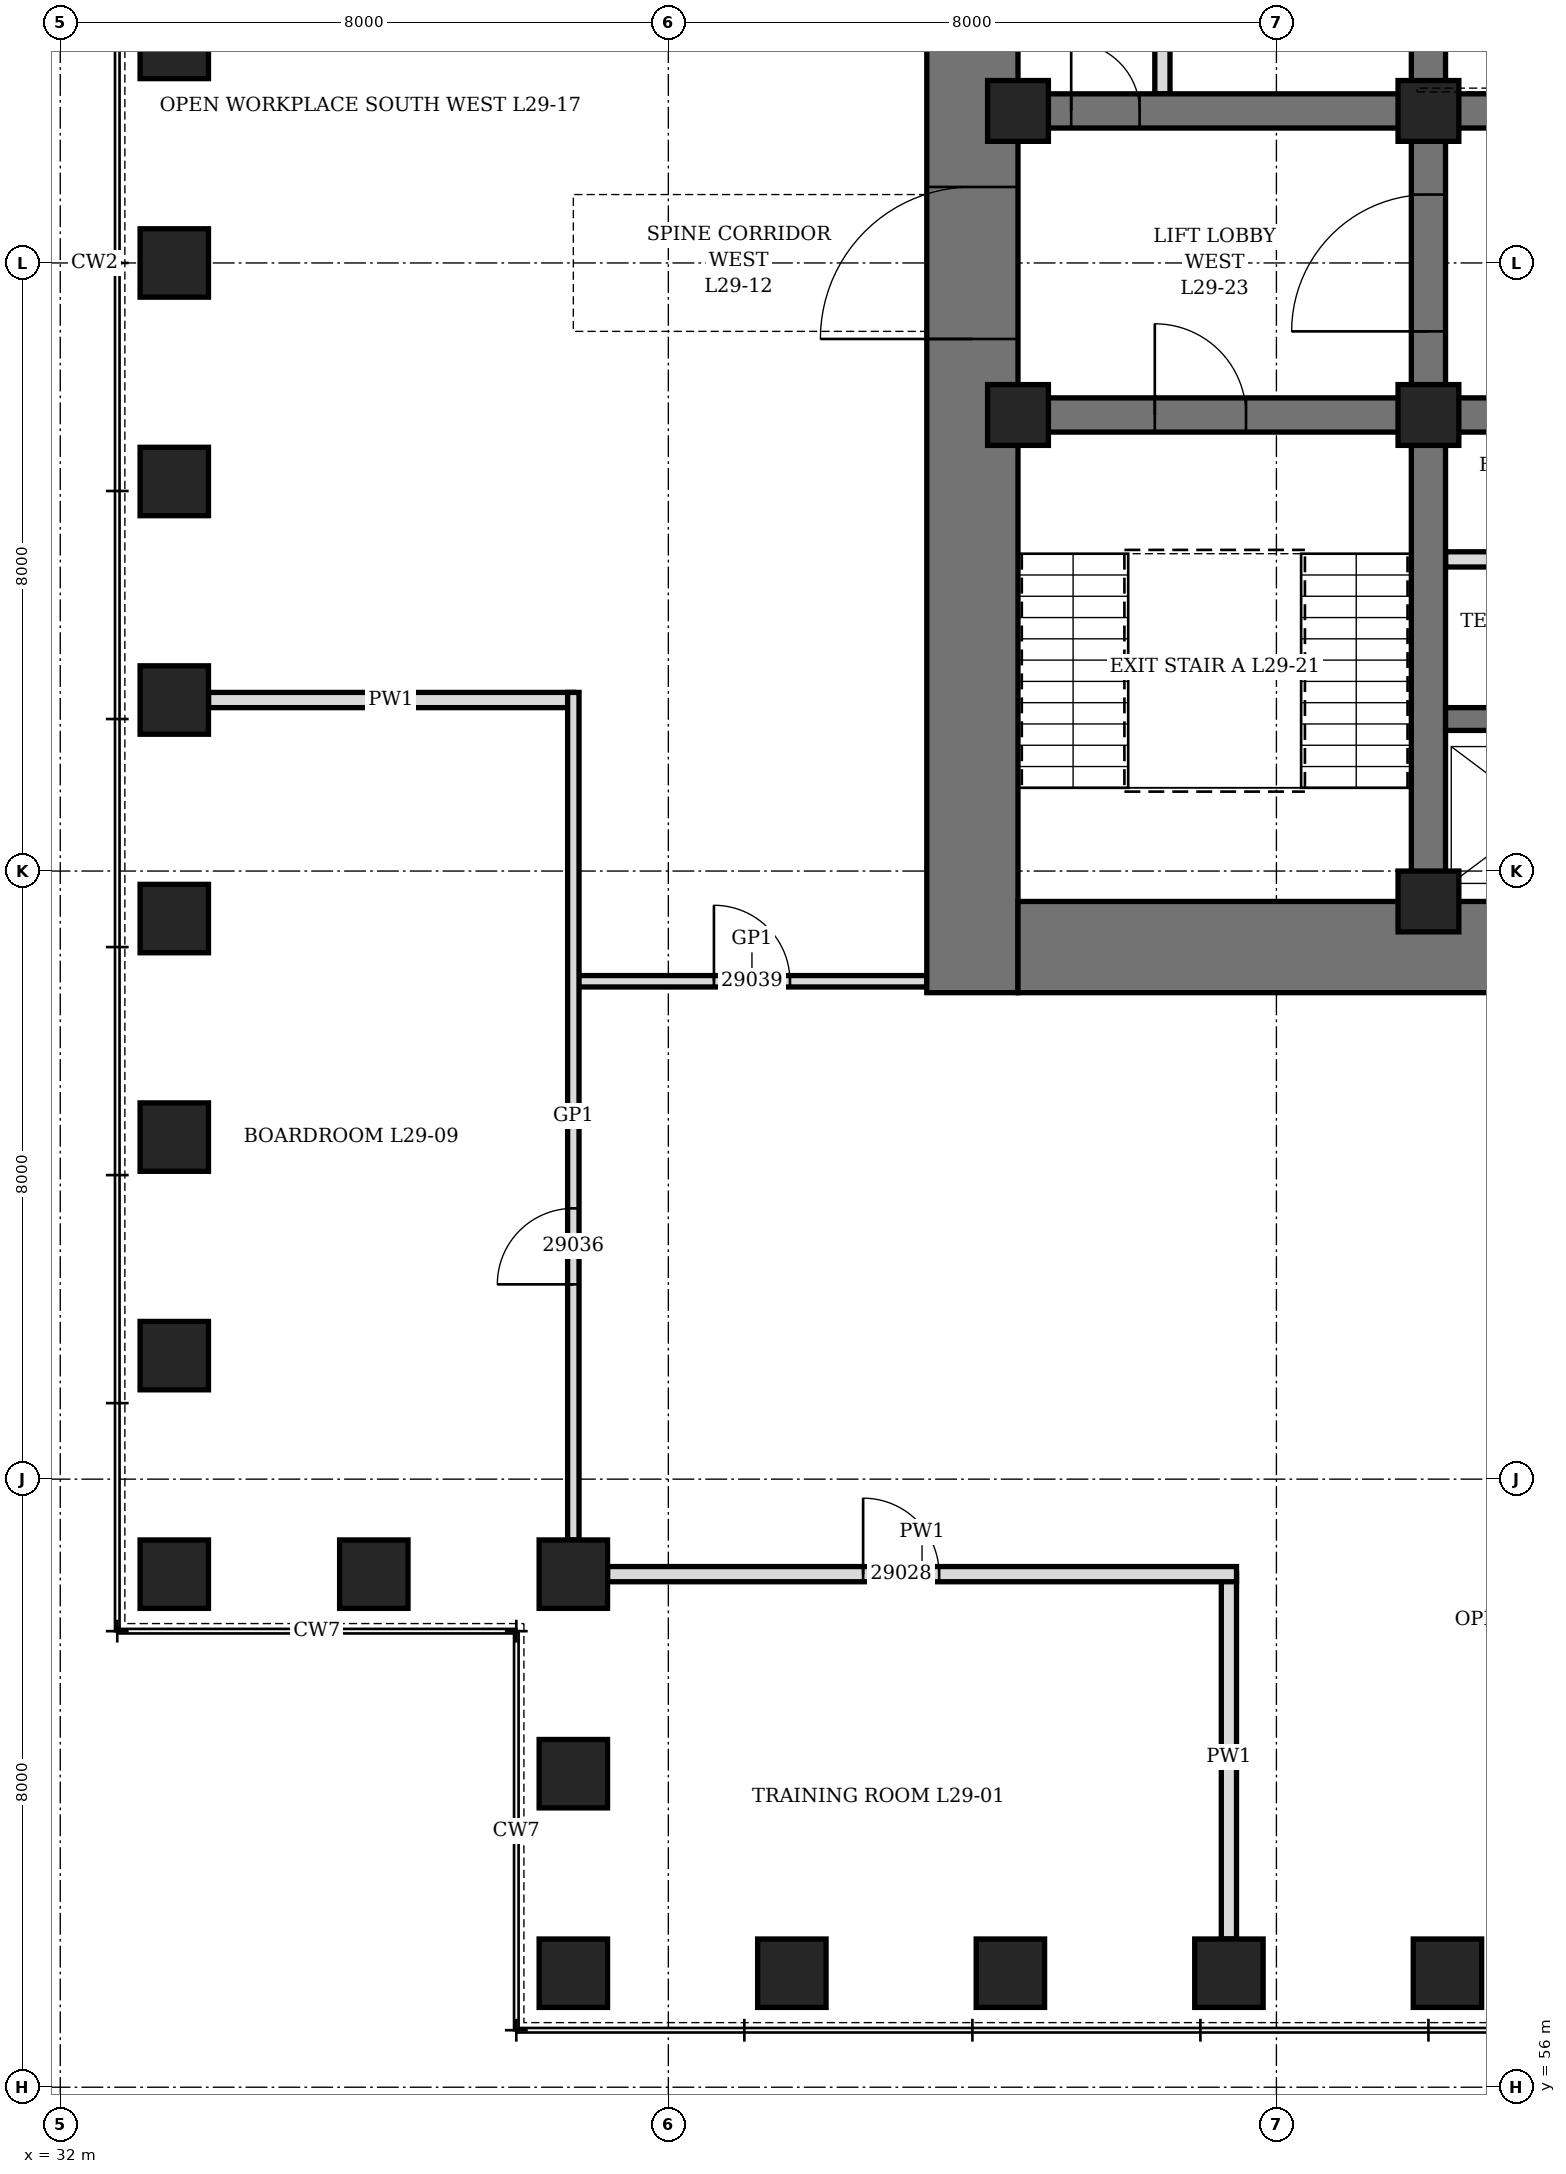
"""IFC4 building model, lengths in metres.
Left out: names, types, materials, properties, quantities, classifications, styles, units other than length and angle.
Written with IfcOpenShell. Run it as: python <this file> out.ifc"""

import sys

from ifc_helpers import new_model, si_unit, direction, frame, frame_2d, origin, origin_2d, place, context, subcontext, project, spatial, rectangle, hollow_rectangle, extrude, element, fill, save


model = new_model("IFC4")
c1 = context("Model", 3, precision=1e-05, world=origin(), true_north=direction((0.0, 1.0)))
c2 = subcontext(c1, "Body", "Model", "MODEL_VIEW")
j1 = project(units=[si_unit("LENGTHUNIT", "METRE"), si_unit("PLANEANGLEUNIT", "RADIAN")], contexts=[c1])
p1 = place(None, origin())
s1 = spatial("IfcSite", under=j1, at=p1, CompositionType="ELEMENT")
p2 = place(p1, origin())
s2 = spatial("IfcBuilding", under=s1, at=p2, CompositionType="ELEMENT")
p3 = place(p2, frame((0.0, 0.0, 133.3)))
s3 = spatial("IfcBuildingStorey", under=s2, at=p3, CompositionType="ELEMENT", Elevation=133.3)
for number, where, z_axis, x_axis in (
    (1, (38.75, 57.5, 0.0), (0.0, 0.0, 1.0), (1.0, 0.0, 0.0)),
    (2, (41.625, 57.5, 0.0), (0.0, 0.0, 1.0), (1.0, 0.0, 0.0)),
    (3, (44.5, 57.5, 0.0), (0.0, 0.0, 1.0), (1.0, 0.0, 0.0)),
    (4, (47.375, 57.5, 0.0), (0.0, 0.0, 1.0), (1.0, 0.0, 0.0)),
    (5, (50.25, 57.5, 0.0), (0.0, 0.0, 1.0), (1.0, 0.0, 0.0)),
    (6, (33.5, 82.875, 0.0), (0.0, 0.0, 1.0), (0.0, 1.0, 0.0)),
    (7, (33.5, 80.0, 0.0), (0.0, 0.0, 1.0), (0.0, 1.0, 0.0)),
    (8, (33.5, 77.125, 0.0), (0.0, 0.0, 1.0), (0.0, 1.0, 0.0)),
    (9, (33.5, 74.25, 0.0), (0.0, 0.0, 1.0), (0.0, 1.0, 0.0)),
    (10, (33.5, 71.375, 0.0), (0.0, 0.0, 1.0), (0.0, 1.0, 0.0)),
    (11, (33.5, 68.5, 0.0), (0.0, 0.0, 1.0), (0.0, 1.0, 0.0)),
    (12, (33.5, 65.625, 0.0), (0.0, 0.0, 1.0), (0.0, 1.0, 0.0)),
    (13, (33.5, 62.75, 0.0), (0.0, 0.0, 1.0), (1.0, 0.0, 0.0)),
    (14, (36.125, 62.75, 0.0), (0.0, 0.0, 1.0), (1.0, 0.0, 0.0)),
    (15, (38.75, 62.75, 0.0), (0.0, 0.0, 1.0), (0.0, 1.0, 0.0)),
    (16, (38.75, 60.125, 0.0), (0.0, 0.0, 1.0), (0.0, 1.0, 0.0)),
):
    element("IfcColumn", number, at=place(p3, frame(where, z_axis=z_axis, x_axis=x_axis)), inside=s3, PredefinedType="COLUMN", context=c2, shape_type="SweptSolid", body=[
        extrude(hollow_rectangle(XDim=0.9, YDim=0.9, WallThickness=0.15, at=origin_2d()), origin(), (0.0, 0.0, 1.0), 4.2),
    ])
p4 = place(p3, frame((44.0, 70.4, 0.0), z_axis=(0.0, 0.0, 1.0), x_axis=(0.0, 1.0, 0.0)))
e17 = element("IfcWall", 17, at=p4, inside=s3, PredefinedType="SHEAR", context=c2, shape_type="SweptSolid", body=[
    extrude(rectangle(XDim=19.2, YDim=1.2, at=frame_2d((9.6, 0.0))), origin(), (0.0, 0.0, 1.0), 4.2),
])
p5 = place(p4, frame((8.6, 0.0, 0.0)))
e18 = element("IfcOpeningElement", 18, at=p5, cuts=e17, PredefinedType="OPENING", context=c2, shape_type="SweptSolid", body=[
    extrude(rectangle(XDim=2.0, YDim=2.4, at=frame_2d((1.0, 1.2))), frame((0.0, 0.61, 0.0), z_axis=(0.0, -1.0, 0.0), x_axis=(1.0, 0.0, 0.0)), (0.0, 0.0, 1.0), 1.22),
])
p6 = place(p3, frame((44.6, 71.0, 0.0), z_axis=(0.0, 0.0, 1.0), x_axis=(1.0, 0.0, 0.0)))
e19 = element("IfcWall", 19, at=p6, inside=s3, PredefinedType="SHEAR", context=c2, shape_type="SweptSolid", body=[
    extrude(rectangle(XDim=22.8, YDim=1.2, at=frame_2d((11.4, 0.0))), origin(), (0.0, 0.0, 1.0), 4.2),
])
p7 = place(p3, frame((50.0, 71.6, 0.0), z_axis=(0.0, 0.0, 1.0), x_axis=(0.0, 1.0, 0.0)))
e20 = element("IfcWall", 20, at=p7, inside=s3, PredefinedType="SHEAR", context=c2, shape_type="SweptSolid", body=[
    extrude(rectangle(XDim=16.8, YDim=0.45, at=frame_2d((8.4, 0.0))), origin(), (0.0, 0.0, 1.0), 4.2),
])
p8 = place(p7, frame((7.5, 0.0, 0.0)))
e21 = element("IfcOpeningElement", 21, at=p8, cuts=e20, PredefinedType="OPENING", context=c2, shape_type="SweptSolid", body=[
    extrude(rectangle(XDim=1.8, YDim=2.4, at=frame_2d((0.9, 1.2))), frame((0.0, 0.235, 0.0), z_axis=(0.0, -1.0, 0.0), x_axis=(1.0, 0.0, 0.0)), (0.0, 0.0, 1.0), 0.47),
])
p9 = place(p3, frame((44.6, 78.0, 0.0), z_axis=(0.0, 0.0, 1.0), x_axis=(1.0, 0.0, 0.0)))
e22 = element("IfcWall", 22, at=p9, inside=s3, PredefinedType="SHEAR", context=c2, shape_type="SweptSolid", body=[
    extrude(rectangle(XDim=5.175, YDim=0.45, at=frame_2d((2.587, 0.0))), origin(), (0.0, 0.0, 1.0), 4.2),
])
p10 = place(p9, frame((1.8, 0.0, 0.0)))
e23 = element("IfcOpeningElement", 23, at=p10, cuts=e22, PredefinedType="OPENING", context=c2, shape_type="SweptSolid", body=[
    extrude(rectangle(XDim=1.2, YDim=2.1, at=frame_2d((0.6, 1.05))), frame((0.0, 0.235, 0.0), z_axis=(0.0, -1.0, 0.0), x_axis=(1.0, 0.0, 0.0)), (0.0, 0.0, 1.0), 0.47),
])
p11 = place(p3, frame((44.6, 82.0, 0.0), z_axis=(0.0, 0.0, 1.0), x_axis=(1.0, 0.0, 0.0)))
e24 = element("IfcWall", 24, at=p11, inside=s3, PredefinedType="SHEAR", context=c2, shape_type="SweptSolid", body=[
    extrude(rectangle(XDim=5.175, YDim=0.45, at=frame_2d((2.587, 0.0))), origin(), (0.0, 0.0, 1.0), 4.2),
])
p12 = place(p11, frame((0.7, 0.0, 0.0)))
e25 = element("IfcOpeningElement", 25, at=p12, cuts=e24, PredefinedType="OPENING", context=c2, shape_type="SweptSolid", body=[
    extrude(rectangle(XDim=0.9, YDim=2.1, at=frame_2d((0.45, 1.05))), frame((0.0, 0.235, 0.0), z_axis=(0.0, -1.0, 0.0), x_axis=(1.0, 0.0, 0.0)), (0.0, 0.0, 1.0), 0.47),
])
p13 = place(p3, frame((50.225, 78.0, 0.0), z_axis=(0.0, 0.0, 1.0), x_axis=(1.0, 0.0, 0.0)))
e26 = element("IfcWall", 26, at=p13, inside=s3, PredefinedType="SHEAR", context=c2, shape_type="SweptSolid", body=[
    extrude(rectangle(XDim=11.55, YDim=0.45, at=frame_2d((5.775, 0.0))), origin(), (0.0, 0.0, 1.0), 4.2),
])
p14 = place(p13, frame((0.825, 0.0, 0.0)))
e27 = element("IfcOpeningElement", 27, at=p14, cuts=e26, PredefinedType="OPENING", context=c2, shape_type="SweptSolid", body=[
    extrude(rectangle(XDim=0.9, YDim=2.1, at=frame_2d((0.45, 1.05))), frame((0.0, 0.235, 0.0), z_axis=(0.0, -1.0, 0.0), x_axis=(1.0, 0.0, 0.0)), (0.0, 0.0, 1.0), 0.47),
])
p15 = place(p13, frame((3.825, 0.0, 0.0)))
e28 = element("IfcOpeningElement", 28, at=p15, cuts=e26, PredefinedType="OPENING", context=c2, shape_type="SweptSolid", body=[
    extrude(rectangle(XDim=0.9, YDim=2.1, at=frame_2d((0.45, 1.05))), frame((0.0, 0.235, 0.0), z_axis=(0.0, -1.0, 0.0), x_axis=(1.0, 0.0, 0.0)), (0.0, 0.0, 1.0), 0.47),
])
p16 = place(p13, frame((6.825, 0.0, 0.0)))
e29 = element("IfcOpeningElement", 29, at=p16, cuts=e26, PredefinedType="OPENING", context=c2, shape_type="SweptSolid", body=[
    extrude(rectangle(XDim=0.9, YDim=2.1, at=frame_2d((0.45, 1.05))), frame((0.0, 0.235, 0.0), z_axis=(0.0, -1.0, 0.0), x_axis=(1.0, 0.0, 0.0)), (0.0, 0.0, 1.0), 0.47),
])
p17 = place(p13, frame((9.825, 0.0, 0.0)))
e30 = element("IfcOpeningElement", 30, at=p17, cuts=e26, PredefinedType="OPENING", context=c2, shape_type="SweptSolid", body=[
    extrude(rectangle(XDim=0.9, YDim=2.1, at=frame_2d((0.45, 1.05))), frame((0.0, 0.235, 0.0), z_axis=(0.0, -1.0, 0.0), x_axis=(1.0, 0.0, 0.0)), (0.0, 0.0, 1.0), 0.47),
])
p18 = place(p3, frame((50.225, 82.0, 0.0), z_axis=(0.0, 0.0, 1.0), x_axis=(1.0, 0.0, 0.0)))
e31 = element("IfcWall", 31, at=p18, inside=s3, PredefinedType="SHEAR", context=c2, shape_type="SweptSolid", body=[
    extrude(rectangle(XDim=11.55, YDim=0.45, at=frame_2d((5.775, 0.0))), origin(), (0.0, 0.0, 1.0), 4.2),
])
p19 = place(p18, frame((0.725, 0.0, 0.0)))
e32 = element("IfcOpeningElement", 32, at=p19, cuts=e31, PredefinedType="OPENING", context=c2, shape_type="SweptSolid", body=[
    extrude(rectangle(XDim=1.1, YDim=2.2, at=frame_2d((0.55, 1.1))), frame((0.0, 0.235, 0.0), z_axis=(0.0, -1.0, 0.0), x_axis=(1.0, 0.0, 0.0)), (0.0, 0.0, 1.0), 0.47),
])
p20 = place(p18, frame((3.725, 0.0, 0.0)))
e33 = element("IfcOpeningElement", 33, at=p20, cuts=e31, PredefinedType="OPENING", context=c2, shape_type="SweptSolid", body=[
    extrude(rectangle(XDim=1.1, YDim=2.2, at=frame_2d((0.55, 1.1))), frame((0.0, 0.235, 0.0), z_axis=(0.0, -1.0, 0.0), x_axis=(1.0, 0.0, 0.0)), (0.0, 0.0, 1.0), 0.47),
])
p21 = place(p18, frame((6.725, 0.0, 0.0)))
e34 = element("IfcOpeningElement", 34, at=p21, cuts=e31, PredefinedType="OPENING", context=c2, shape_type="SweptSolid", body=[
    extrude(rectangle(XDim=1.1, YDim=2.2, at=frame_2d((0.55, 1.1))), frame((0.0, 0.235, 0.0), z_axis=(0.0, -1.0, 0.0), x_axis=(1.0, 0.0, 0.0)), (0.0, 0.0, 1.0), 0.47),
])
p22 = place(p18, frame((9.725, 0.0, 0.0)))
e35 = element("IfcOpeningElement", 35, at=p22, cuts=e31, PredefinedType="OPENING", context=c2, shape_type="SweptSolid", body=[
    extrude(rectangle(XDim=1.1, YDim=2.2, at=frame_2d((0.55, 1.1))), frame((0.0, 0.235, 0.0), z_axis=(0.0, -1.0, 0.0), x_axis=(1.0, 0.0, 0.0)), (0.0, 0.0, 1.0), 0.47),
])
p23 = place(p3, frame((50.225, 74.0, 0.0), z_axis=(0.0, 0.0, 1.0), x_axis=(1.0, 0.0, 0.0)))
e36 = element("IfcWall", 36, at=p23, inside=s3, PredefinedType="SHEAR", context=c2, shape_type="SweptSolid", body=[
    extrude(rectangle(XDim=11.55, YDim=0.3, at=frame_2d((5.775, 0.0))), origin(), (0.0, 0.0, 1.0), 4.2),
])
for number, where, z_axis, x_axis in (
    (37, (44.6, 78.0, 0.0), (0.0, 0.0, 1.0), (1.0, 0.0, 0.0)),
    (38, (44.6, 82.0, 0.0), (0.0, 0.0, 1.0), (1.0, 0.0, 0.0)),
    (39, (50.0, 71.6, 0.0), (0.0, 0.0, 1.0), (1.0, 0.0, 0.0)),
    (40, (50.0, 78.0, 0.0), (0.0, 0.0, 1.0), (1.0, 0.0, 0.0)),
    (41, (50.0, 82.0, 0.0), (0.0, 0.0, 1.0), (1.0, 0.0, 0.0)),
):
    element("IfcColumn", number, at=place(p3, frame(where, z_axis=z_axis, x_axis=x_axis)), inside=s3, PredefinedType="COLUMN", context=c2, shape_type="SweptSolid", body=[
        extrude(hollow_rectangle(XDim=0.8, YDim=0.8, WallThickness=0.1, at=origin_2d()), origin(), (0.0, 0.0, 1.0), 4.2),
    ])
p24 = place(p3, frame((46.5, 82.225, 0.0), z_axis=(0.0, 0.0, 1.0), x_axis=(0.0, 1.0, 0.0)))
e42 = element("IfcWall", 42, at=p24, inside=s3, PredefinedType="PARTITIONING", context=c2, shape_type="SweptSolid", body=[
    extrude(rectangle(XDim=3.05, YDim=0.2, at=frame_2d((1.525, 0.0))), origin(), (0.0, 0.0, 1.0), 4.04),
])
p25 = place(p24, frame((1.075, 0.0, 0.0)))
e43 = element("IfcOpeningElement", 43, at=p25, cuts=e42, PredefinedType="OPENING", context=c2, shape_type="SweptSolid", body=[
    extrude(rectangle(XDim=0.9, YDim=2.1, at=frame_2d((0.45, 1.05))), frame((0.0, 0.11, 0.0), z_axis=(0.0, -1.0, 0.0), x_axis=(1.0, 0.0, 0.0)), (0.0, 0.0, 1.0), 0.22),
])
p26 = place(p3, frame((50.225, 76.1, 0.0), z_axis=(0.0, 0.0, 1.0), x_axis=(1.0, 0.0, 0.0)))
e44 = element("IfcWall", 44, at=p26, inside=s3, PredefinedType="PARTITIONING", context=c2, shape_type="SweptSolid", body=[
    extrude(rectangle(XDim=2.55, YDim=0.2, at=frame_2d((1.275, 0.0))), origin(), (0.0, 0.0, 1.0), 4.04),
])
p27 = place(p26, frame((0.825, 0.0, 0.0)))
e45 = element("IfcOpeningElement", 45, at=p27, cuts=e44, PredefinedType="OPENING", context=c2, shape_type="SweptSolid", body=[
    extrude(rectangle(XDim=0.9, YDim=2.1, at=frame_2d((0.45, 1.05))), frame((0.0, 0.11, 0.0), z_axis=(0.0, -1.0, 0.0), x_axis=(1.0, 0.0, 0.0)), (0.0, 0.0, 1.0), 0.22),
])
p28 = place(p3, frame((47.375, 57.95, 0.0), z_axis=(0.0, 0.0, 1.0), x_axis=(0.0, 1.0, 0.0)))
e46 = element("IfcWall", 46, at=p28, inside=s3, PredefinedType="PARTITIONING", context=c2, shape_type="SweptSolid", body=[
    extrude(rectangle(XDim=4.8, YDim=0.2, at=frame_2d((2.4, 0.0))), origin(), (0.0, 0.0, 1.0), 3.278),
])
p29 = place(p3, frame((33.95, 74.25, 0.0), z_axis=(0.0, 0.0, 1.0), x_axis=(1.0, 0.0, 0.0)))
e47 = element("IfcWall", 47, at=p29, inside=s3, PredefinedType="PARTITIONING", context=c2, shape_type="SweptSolid", body=[
    extrude(rectangle(XDim=4.8, YDim=0.2, at=frame_2d((2.4, 0.0))), origin(), (0.0, 0.0, 1.0), 3.428),
])
p30 = place(p3, frame((39.2, 62.75, 0.0), z_axis=(0.0, 0.0, 1.0), x_axis=(1.0, 0.0, 0.0)))
e48 = element("IfcWall", 48, at=p30, inside=s3, PredefinedType="PARTITIONING", context=c2, shape_type="SweptSolid", body=[
    extrude(rectangle(XDim=8.275, YDim=0.2, at=frame_2d((4.138, 0.0))), origin(), (0.0, 0.0, 1.0), 4.04),
])
p31 = place(p30, frame((3.363, 0.0, 0.0)))
e49 = element("IfcOpeningElement", 49, at=p31, cuts=e48, PredefinedType="OPENING", context=c2, shape_type="SweptSolid", body=[
    extrude(rectangle(XDim=1.0, YDim=2.1, at=frame_2d((0.5, 1.05))), frame((0.0, 0.11, 0.0), z_axis=(0.0, -1.0, 0.0), x_axis=(1.0, 0.0, 0.0)), (0.0, 0.0, 1.0), 0.22),
])
p32 = place(p3, frame((38.8, 70.55, 0.0), z_axis=(0.0, 0.0, 1.0), x_axis=(1.0, 0.0, 0.0)))
e50 = element("IfcWall", 50, at=p32, inside=s3, PredefinedType="PARTITIONING", context=c2, shape_type="SweptSolid", body=[
    extrude(rectangle(XDim=4.6, YDim=0.15, at=frame_2d((2.3, 0.0))), origin(), (0.0, 0.0, 1.0), 4.04),
])
p33 = place(p32, frame((1.8, 0.0, 0.0)))
e51 = element("IfcOpeningElement", 51, at=p33, cuts=e50, PredefinedType="OPENING", context=c2, shape_type="SweptSolid", body=[
    extrude(rectangle(XDim=1.0, YDim=2.4, at=frame_2d((0.5, 1.2))), frame((0.0, 0.085, 0.0), z_axis=(0.0, -1.0, 0.0), x_axis=(1.0, 0.0, 0.0)), (0.0, 0.0, 1.0), 0.17),
])
p34 = place(p3, frame((38.75, 63.2, 0.0), z_axis=(0.0, 0.0, 1.0), x_axis=(0.0, 1.0, 0.0)))
e52 = element("IfcWall", 52, at=p34, inside=s3, PredefinedType="PARTITIONING", context=c2, shape_type="SweptSolid", body=[
    extrude(rectangle(XDim=11.15, YDim=0.15, at=frame_2d((5.575, 0.0))), origin(), (0.0, 0.0, 1.0), 4.04),
])
p35 = place(p34, frame((3.363, 0.0, 0.0)))
e53 = element("IfcOpeningElement", 53, at=p35, cuts=e52, PredefinedType="OPENING", context=c2, shape_type="SweptSolid", body=[
    extrude(rectangle(XDim=1.0, YDim=2.4, at=frame_2d((0.5, 1.2))), frame((0.0, 0.085, 0.0), z_axis=(0.0, -1.0, 0.0), x_axis=(1.0, 0.0, 0.0)), (0.0, 0.0, 1.0), 0.17),
])
p36 = place(p12, origin())
e54 = element("IfcDoor", 54, at=p36, inside=s3, OperationType="SINGLE_SWING_LEFT", PredefinedType="DOOR", context=c2, shape_type="SweptSolid", body=[
    extrude(rectangle(XDim=0.9, YDim=2.1, at=frame_2d((0.45, 1.05))), frame((0.0, 0.225, 0.0), z_axis=(0.0, -1.0, 0.0), x_axis=(1.0, 0.0, 0.0)), (0.0, 0.0, 1.0), 0.449),
])
fill(e25, e54)
p37 = place(p10, origin())
e55 = element("IfcDoor", 55, at=p37, inside=s3, OperationType="SINGLE_SWING_LEFT", PredefinedType="DOOR", context=c2, shape_type="SweptSolid", body=[
    extrude(rectangle(XDim=1.2, YDim=2.1, at=frame_2d((0.6, 1.05))), frame((0.0, 0.225, 0.0), z_axis=(0.0, -1.0, 0.0), x_axis=(1.0, 0.0, 0.0)), (0.0, 0.0, 1.0), 0.449),
])
fill(e23, e55)
p38 = place(p5, origin())
e56 = element("IfcDoor", 56, at=p38, inside=s3, OperationType="DOUBLE_DOOR_SINGLE_SWING", PredefinedType="DOOR", context=c2, shape_type="SweptSolid", body=[
    extrude(rectangle(XDim=2.0, YDim=2.4, at=frame_2d((1.0, 1.2))), frame((0.0, 0.35, 0.0), z_axis=(0.0, -1.0, 0.0), x_axis=(1.0, 0.0, 0.0)), (0.0, 0.0, 1.0), 0.7),
])
fill(e18, e56)
p39 = place(p8, origin())
e57 = element("IfcDoor", 57, at=p39, inside=s3, OperationType="DOUBLE_DOOR_SINGLE_SWING", PredefinedType="DOOR", context=c2, shape_type="SweptSolid", body=[
    extrude(rectangle(XDim=1.8, YDim=2.4, at=frame_2d((0.9, 1.2))), frame((0.0, 0.225, 0.0), z_axis=(0.0, -1.0, 0.0), x_axis=(1.0, 0.0, 0.0)), (0.0, 0.0, 1.0), 0.449),
])
fill(e21, e57)
p40 = place(p31, origin())
e58 = element("IfcDoor", 58, at=p40, inside=s3, OperationType="SINGLE_SWING_LEFT", PredefinedType="DOOR", context=c2, shape_type="SweptSolid", body=[
    extrude(rectangle(XDim=1.0, YDim=2.1, at=frame_2d((0.5, 1.05))), frame((0.0, 0.1, 0.0), z_axis=(0.0, -1.0, 0.0), x_axis=(1.0, 0.0, 0.0)), (0.0, 0.0, 1.0), 0.199),
])
fill(e49, e58)
p41 = place(p35, origin())
e59 = element("IfcDoor", 59, at=p41, inside=s3, OperationType="SINGLE_SWING_RIGHT", PredefinedType="DOOR", context=c2, shape_type="SweptSolid", body=[
    extrude(rectangle(XDim=1.0, YDim=2.4, at=frame_2d((0.5, 1.2))), frame((0.0, 0.075, 0.0), z_axis=(0.0, -1.0, 0.0), x_axis=(1.0, 0.0, 0.0)), (0.0, 0.0, 1.0), 0.149),
])
fill(e53, e59)
p42 = place(p33, origin())
e60 = element("IfcDoor", 60, at=p42, inside=s3, OperationType="SINGLE_SWING_RIGHT", PredefinedType="DOOR", context=c2, shape_type="SweptSolid", body=[
    extrude(rectangle(XDim=1.0, YDim=2.4, at=frame_2d((0.5, 1.2))), frame((0.0, 0.075, 0.0), z_axis=(0.0, -1.0, 0.0), x_axis=(1.0, 0.0, 0.0)), (0.0, 0.0, 1.0), 0.149),
])
fill(e51, e60)
save(model, sys.argv[1])
